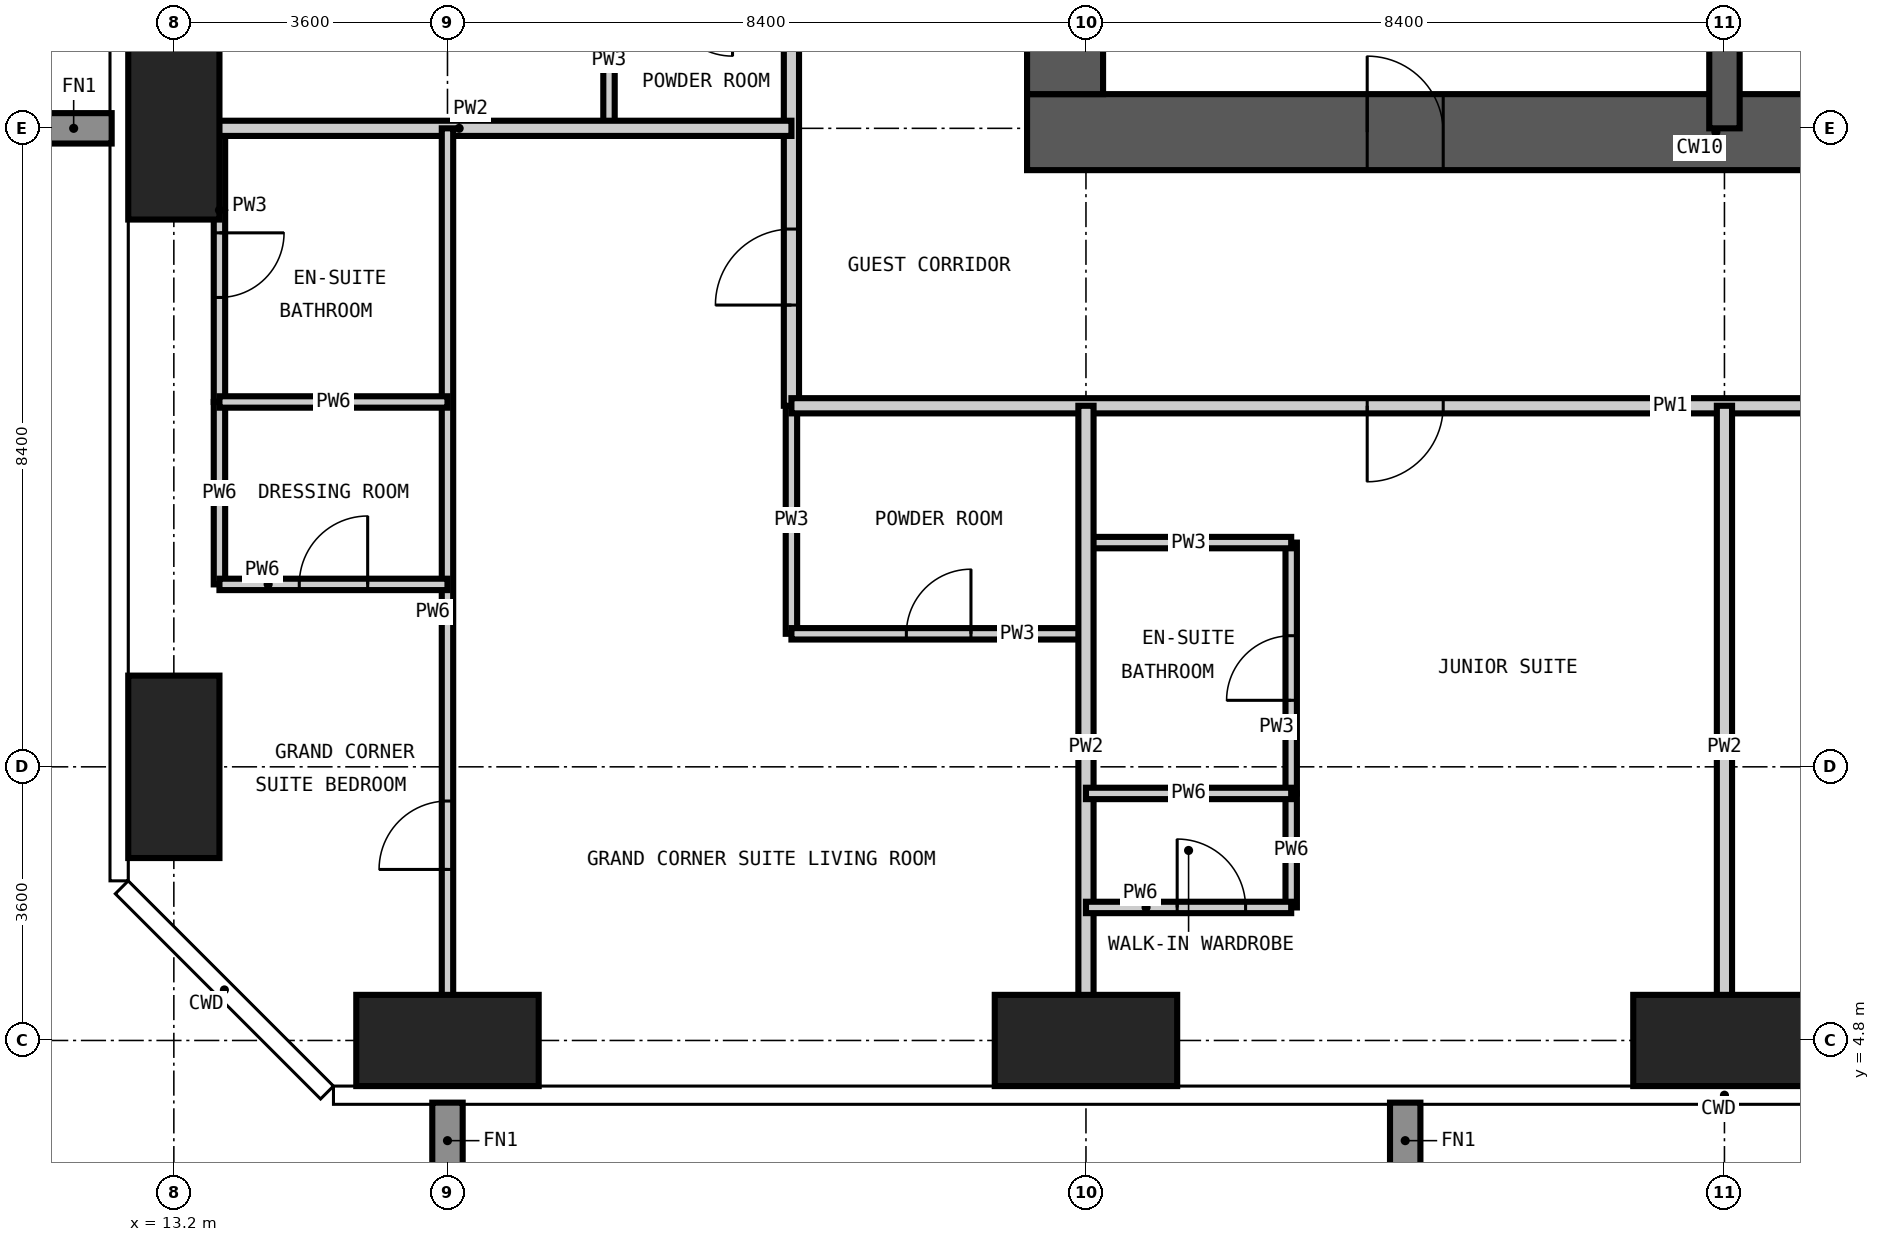
"""IFC4 building model, lengths in metres.
Left out: names, types, materials, properties, quantities, classifications, styles, units other than length and angle.
Written with IfcOpenShell. Run it as: python <this file> out.ifc"""

import sys

from ifc_helpers import new_model, si_unit, direction, frame, frame_2d, origin, origin_2d, place, context, subcontext, project, spatial, rectangle, extrude, element, fill, save


model = new_model("IFC4")
c1 = context("Model", 3, precision=1e-05, world=origin(), true_north=direction((0.0, 1.0)))
c2 = subcontext(c1, "Body", "Model", "MODEL_VIEW")
j1 = project(units=[si_unit("LENGTHUNIT", "METRE"), si_unit("PLANEANGLEUNIT", "RADIAN")], contexts=[c1])
p1 = place(None, origin())
s1 = spatial("IfcSite", under=j1, at=p1, CompositionType="ELEMENT")
p2 = place(p1, origin())
s2 = spatial("IfcBuilding", under=s1, at=p2, CompositionType="ELEMENT")
p3 = place(p2, frame((0.0, 0.0, 229.5)))
s3 = spatial("IfcBuildingStorey", under=s2, at=p3, CompositionType="ELEMENT", Elevation=229.5)
for number, where, z_axis, x_axis in (
    (1, (13.2, 8.4, -0.35), (0.0, 0.0, 1.0), (1.0, 0.0, 0.0)),
    (2, (13.2, 16.8, -0.35), (0.0, 0.0, 1.0), (1.0, 0.0, 0.0)),
):
    element("IfcColumn", number, at=place(p3, frame(where, z_axis=z_axis, x_axis=x_axis)), inside=s3, PredefinedType="COLUMN", context=c2, shape_type="SweptSolid", body=[
        extrude(rectangle(XDim=1.2, YDim=2.4, at=origin_2d()), origin(), (0.0, 0.0, 1.0), 3.9),
    ])
for number, where, z_axis, x_axis in (
    (3, (16.8, 4.8, -0.35), (0.0, 0.0, 1.0), (1.0, 0.0, 0.0)),
    (4, (25.2, 4.8, -0.35), (0.0, 0.0, 1.0), (1.0, 0.0, 0.0)),
    (5, (33.6, 4.8, -0.35), (0.0, 0.0, 1.0), (1.0, 0.0, 0.0)),
):
    element("IfcColumn", number, at=place(p3, frame(where, z_axis=z_axis, x_axis=x_axis)), inside=s3, PredefinedType="COLUMN", context=c2, shape_type="SweptSolid", body=[
        extrude(rectangle(XDim=2.4, YDim=1.2, at=origin_2d()), origin(), (0.0, 0.0, 1.0), 3.9),
    ])
p4 = place(p3, frame((24.425, 16.75, -0.35), z_axis=(0.0, 0.0, 1.0), x_axis=(1.0, 0.0, 0.0)))
e6 = element("IfcWall", 6, at=p4, inside=s3, PredefinedType="SHEAR", context=c2, shape_type="SweptSolid", body=[
    extrude(rectangle(XDim=18.125, YDim=1.0, at=frame_2d((9.062, 0.0))), origin(), (0.0, 0.0, 1.0), 3.9),
])
p5 = place(p4, frame((4.475, 0.0, 0.35)))
e7 = element("IfcOpeningElement", 7, at=p5, cuts=e6, PredefinedType="OPENING", context=c2, shape_type="SweptSolid", body=[
    extrude(rectangle(XDim=1.0, YDim=2.1, at=frame_2d((0.5, 1.05))), frame((0.0, 0.51, 0.0), z_axis=(0.0, -1.0, 0.0), x_axis=(1.0, 0.0, 0.0)), (0.0, 0.0, 1.0), 1.02),
])
p6 = place(p4, frame((10.775, 0.0, 0.35)))
e8 = element("IfcOpeningElement", 8, at=p6, cuts=e6, PredefinedType="OPENING", context=c2, shape_type="SweptSolid", body=[
    extrude(rectangle(XDim=1.0, YDim=2.1, at=frame_2d((0.5, 1.05))), frame((0.0, 0.51, 0.0), z_axis=(0.0, -1.0, 0.0), x_axis=(1.0, 0.0, 0.0)), (0.0, 0.0, 1.0), 1.02),
])
p7 = place(p3, frame((24.925, 41.55, -0.35), z_axis=(0.0, 0.0, 1.0), x_axis=(0.0, -1.0, 0.0)))
e9 = element("IfcWall", 9, at=p7, inside=s3, PredefinedType="SHEAR", context=c2, shape_type="SweptSolid", body=[
    extrude(rectangle(XDim=24.3, YDim=1.0, at=frame_2d((12.15, 0.0))), origin(), (0.0, 0.0, 1.0), 3.9),
])
p8 = place(p7, frame((11.65, 0.0, 0.35)))
e10 = element("IfcOpeningElement", 10, at=p8, cuts=e9, PredefinedType="OPENING", context=c2, shape_type="SweptSolid", body=[
    extrude(rectangle(XDim=1.0, YDim=2.1, at=frame_2d((0.5, 1.05))), frame((0.0, 0.51, 0.0), z_axis=(0.0, -1.0, 0.0), x_axis=(1.0, 0.0, 0.0)), (0.0, 0.0, 1.0), 1.02),
])
p9 = place(p3, frame((33.6, 16.8, -0.35), z_axis=(0.0, 0.0, 1.0), x_axis=(0.0, 1.0, 0.0)))
e11 = element("IfcWall", 11, at=p9, inside=s3, PredefinedType="SHEAR", context=c2, shape_type="SweptSolid", body=[
    extrude(rectangle(XDim=25.2, YDim=0.4, at=frame_2d((12.6, 0.0))), origin(), (0.0, 0.0, 1.0), 3.9),
])
p10 = place(p9, frame((22.5, 0.0, 0.35)))
e12 = element("IfcOpeningElement", 12, at=p10, cuts=e11, PredefinedType="OPENING", context=c2, shape_type="SweptSolid", body=[
    extrude(rectangle(XDim=1.2, YDim=2.2, at=frame_2d((0.6, 1.1))), frame((0.0, 0.21, 0.0), z_axis=(0.0, -1.0, 0.0), x_axis=(1.0, 0.0, 0.0)), (0.0, 0.0, 1.0), 0.42),
])
p11 = place(p9, frame((18.3, 0.0, 0.35)))
e13 = element("IfcOpeningElement", 13, at=p11, cuts=e11, PredefinedType="OPENING", context=c2, shape_type="SweptSolid", body=[
    extrude(rectangle(XDim=1.2, YDim=2.2, at=frame_2d((0.6, 1.1))), frame((0.0, 0.21, 0.0), z_axis=(0.0, -1.0, 0.0), x_axis=(1.0, 0.0, 0.0)), (0.0, 0.0, 1.0), 0.42),
])
p12 = place(p9, frame((9.3, 0.0, 0.35)))
e14 = element("IfcOpeningElement", 14, at=p12, cuts=e11, PredefinedType="OPENING", context=c2, shape_type="SweptSolid", body=[
    extrude(rectangle(XDim=1.0, YDim=2.1, at=frame_2d((0.5, 1.05))), frame((0.0, 0.21, 0.0), z_axis=(0.0, -1.0, 0.0), x_axis=(1.0, 0.0, 0.0)), (0.0, 0.0, 1.0), 0.42),
])
p13 = place(p3, frame((13.8, 13.2, 0.0), z_axis=(0.0, 0.0, 1.0), x_axis=(0.0, 1.0, 0.0)))
e15 = element("IfcWall", 15, at=p13, inside=s3, PredefinedType="PARTITIONING", context=c2, shape_type="SweptSolid", body=[
    extrude(rectangle(XDim=3.6, YDim=0.15, at=frame_2d((1.8, 0.0))), origin(), (0.0, 0.0, 1.0), 3.55),
])
p14 = place(p13, frame((1.375, 0.0, 0.0)))
e16 = element("IfcOpeningElement", 16, at=p14, cuts=e15, PredefinedType="OPENING", context=c2, shape_type="SweptSolid", body=[
    extrude(rectangle(XDim=0.85, YDim=2.1, at=frame_2d((0.425, 1.05))), frame((0.0, 0.085, 0.0), z_axis=(0.0, -1.0, 0.0), x_axis=(1.0, 0.0, 0.0)), (0.0, 0.0, 1.0), 0.17),
])
p15 = place(p3, frame((18.925, 16.8, 0.0), z_axis=(0.0, 0.0, 1.0), x_axis=(0.0, 1.0, 0.0)))
e17 = element("IfcWall", 17, at=p15, inside=s3, PredefinedType="PARTITIONING", context=c2, shape_type="SweptSolid", body=[
    extrude(rectangle(XDim=1.8, YDim=0.15, at=frame_2d((0.9, 0.0))), origin(), (0.0, 0.0, 1.0), 3.55),
])
p16 = place(p3, frame((21.325, 10.15, 0.0), z_axis=(0.0, 0.0, 1.0), x_axis=(0.0, 1.0, 0.0)))
e18 = element("IfcWall", 18, at=p16, inside=s3, PredefinedType="PARTITIONING", context=c2, shape_type="SweptSolid", body=[
    extrude(rectangle(XDim=3.0, YDim=0.15, at=frame_2d((1.5, 0.0))), origin(), (0.0, 0.0, 1.0), 3.55),
])
p17 = place(p3, frame((27.9, 8.05, 0.0), z_axis=(0.0, 0.0, 1.0), x_axis=(0.0, 1.0, 0.0)))
e19 = element("IfcWall", 19, at=p17, inside=s3, PredefinedType="PARTITIONING", context=c2, shape_type="SweptSolid", body=[
    extrude(rectangle(XDim=3.3, YDim=0.15, at=frame_2d((1.65, 0.0))), origin(), (0.0, 0.0, 1.0), 3.55),
])
p18 = place(p17, frame((1.225, 0.0, 0.0)))
e20 = element("IfcOpeningElement", 20, at=p18, cuts=e19, PredefinedType="OPENING", context=c2, shape_type="SweptSolid", body=[
    extrude(rectangle(XDim=0.85, YDim=2.1, at=frame_2d((0.425, 1.05))), frame((0.0, 0.085, 0.0), z_axis=(0.0, -1.0, 0.0), x_axis=(1.0, 0.0, 0.0)), (0.0, 0.0, 1.0), 0.17),
])
p19 = place(p3, frame((21.325, 10.15, 0.0), z_axis=(0.0, 0.0, 1.0), x_axis=(1.0, 0.0, 0.0)))
e21 = element("IfcWall", 21, at=p19, inside=s3, PredefinedType="PARTITIONING", context=c2, shape_type="SweptSolid", body=[
    extrude(rectangle(XDim=3.875, YDim=0.15, at=frame_2d((1.938, 0.0))), origin(), (0.0, 0.0, 1.0), 3.55),
])
p20 = place(p19, frame((1.512, 0.0, 0.0)))
e22 = element("IfcOpeningElement", 22, at=p20, cuts=e21, PredefinedType="OPENING", context=c2, shape_type="SweptSolid", body=[
    extrude(rectangle(XDim=0.85, YDim=2.1, at=frame_2d((0.425, 1.05))), frame((0.0, 0.085, 0.0), z_axis=(0.0, -1.0, 0.0), x_axis=(1.0, 0.0, 0.0)), (0.0, 0.0, 1.0), 0.17),
])
p21 = place(p3, frame((25.2, 11.35, 0.0), z_axis=(0.0, 0.0, 1.0), x_axis=(1.0, 0.0, 0.0)))
e23 = element("IfcWall", 23, at=p21, inside=s3, PredefinedType="PARTITIONING", context=c2, shape_type="SweptSolid", body=[
    extrude(rectangle(XDim=2.7, YDim=0.15, at=frame_2d((1.35, 0.0))), origin(), (0.0, 0.0, 1.0), 3.55),
])
p22 = place(p3, frame((21.325, 13.15, 0.0), z_axis=(0.0, 0.0, 1.0), x_axis=(0.0, 1.0, 0.0)))
e24 = element("IfcWall", 24, at=p22, inside=s3, PredefinedType="PARTITIONING", context=c2, shape_type="SweptSolid", body=[
    extrude(rectangle(XDim=31.9, YDim=0.2, at=frame_2d((15.95, 0.0))), origin(), (0.0, 0.0, 1.0), 3.55),
])
p23 = place(p22, frame((6.15, 0.0, 0.0)))
e25 = element("IfcOpeningElement", 25, at=p23, cuts=e24, PredefinedType="OPENING", context=c2, shape_type="SweptSolid", body=[
    extrude(rectangle(XDim=1.0, YDim=2.2, at=frame_2d((0.5, 1.1))), frame((0.0, 0.11, 0.0), z_axis=(0.0, -1.0, 0.0), x_axis=(1.0, 0.0, 0.0)), (0.0, 0.0, 1.0), 0.22),
])
p24 = place(p22, frame((16.95, 0.0, 0.0)))
e26 = element("IfcOpeningElement", 26, at=p24, cuts=e24, PredefinedType="OPENING", context=c2, shape_type="SweptSolid", body=[
    extrude(rectangle(XDim=1.0, YDim=2.2, at=frame_2d((0.5, 1.1))), frame((0.0, 0.11, 0.0), z_axis=(0.0, -1.0, 0.0), x_axis=(1.0, 0.0, 0.0)), (0.0, 0.0, 1.0), 0.22),
])
p25 = place(p22, frame((22.95, 0.0, 0.0)))
e27 = element("IfcOpeningElement", 27, at=p25, cuts=e24, PredefinedType="OPENING", context=c2, shape_type="SweptSolid", body=[
    extrude(rectangle(XDim=1.0, YDim=2.2, at=frame_2d((0.5, 1.1))), frame((0.0, 0.11, 0.0), z_axis=(0.0, -1.0, 0.0), x_axis=(1.0, 0.0, 0.0)), (0.0, 0.0, 1.0), 0.22),
])
p26 = place(p22, frame((1.325, 0.0, 0.0)))
e28 = element("IfcOpeningElement", 28, at=p26, cuts=e24, PredefinedType="OPENING", context=c2, shape_type="SweptSolid", body=[
    extrude(rectangle(XDim=1.0, YDim=2.2, at=frame_2d((0.5, 1.1))), frame((0.0, 0.11, 0.0), z_axis=(0.0, -1.0, 0.0), x_axis=(1.0, 0.0, 0.0)), (0.0, 0.0, 1.0), 0.22),
])
p27 = place(p22, frame((29.875, 0.0, 0.0)))
e29 = element("IfcOpeningElement", 29, at=p27, cuts=e24, PredefinedType="OPENING", context=c2, shape_type="SweptSolid", body=[
    extrude(rectangle(XDim=1.0, YDim=2.2, at=frame_2d((0.5, 1.1))), frame((0.0, 0.11, 0.0), z_axis=(0.0, -1.0, 0.0), x_axis=(1.0, 0.0, 0.0)), (0.0, 0.0, 1.0), 0.22),
])
p28 = place(p3, frame((44.45, 13.15, 0.0), z_axis=(0.0, 0.0, 1.0), x_axis=(-1.0, 0.0, 0.0)))
e30 = element("IfcWall", 30, at=p28, inside=s3, PredefinedType="PARTITIONING", context=c2, shape_type="SweptSolid", body=[
    extrude(rectangle(XDim=23.125, YDim=0.2, at=frame_2d((11.562, 0.0))), origin(), (0.0, 0.0, 1.0), 3.55),
])
p29 = place(p28, frame((14.55, 0.0, 0.0)))
e31 = element("IfcOpeningElement", 31, at=p29, cuts=e30, PredefinedType="OPENING", context=c2, shape_type="SweptSolid", body=[
    extrude(rectangle(XDim=1.0, YDim=2.2, at=frame_2d((0.5, 1.1))), frame((0.0, 0.11, 0.0), z_axis=(0.0, -1.0, 0.0), x_axis=(1.0, 0.0, 0.0)), (0.0, 0.0, 1.0), 0.22),
])
p30 = place(p28, frame((6.15, 0.0, 0.0)))
e32 = element("IfcOpeningElement", 32, at=p30, cuts=e30, PredefinedType="OPENING", context=c2, shape_type="SweptSolid", body=[
    extrude(rectangle(XDim=1.0, YDim=2.2, at=frame_2d((0.5, 1.1))), frame((0.0, 0.11, 0.0), z_axis=(0.0, -1.0, 0.0), x_axis=(1.0, 0.0, 0.0)), (0.0, 0.0, 1.0), 0.22),
])
for number, where, z_axis, x_axis in (
    (33, (25.2, 4.182, 0.0), (0.0, 0.0, 1.0), (0.0, 1.0, 0.0)),
    (34, (33.6, 4.182, 0.0), (0.0, 0.0, 1.0), (0.0, 1.0, 0.0)),
):
    element("IfcWall", number, at=place(p3, frame(where, z_axis=z_axis, x_axis=x_axis)), inside=s3, PredefinedType="PARTITIONING", context=c2, shape_type="SweptSolid", body=[
        extrude(rectangle(XDim=8.968, YDim=0.2, at=frame_2d((4.484, 0.0))), origin(), (0.0, 0.0, 1.0), 3.55),
    ])
p31 = place(p3, frame((12.582, 16.8, 0.0), z_axis=(0.0, 0.0, 1.0), x_axis=(1.0, 0.0, 0.0)))
e35 = element("IfcWall", 35, at=p31, inside=s3, PredefinedType="PARTITIONING", context=c2, shape_type="SweptSolid", body=[
    extrude(rectangle(XDim=8.743, YDim=0.2, at=frame_2d((4.372, 0.0))), origin(), (0.0, 0.0, 1.0), 3.55),
])
p32 = place(p3, frame((13.8, 10.8, 0.0), z_axis=(0.0, 0.0, 1.0), x_axis=(0.0, 1.0, 0.0)))
e36 = element("IfcWall", 36, at=p32, inside=s3, PredefinedType="PARTITIONING", context=c2, shape_type="SweptSolid", body=[
    extrude(rectangle(XDim=2.4, YDim=0.15, at=frame_2d((1.2, 0.0))), origin(), (0.0, 0.0, 1.0), 3.55),
])
p33 = place(p3, frame((16.8, 4.182, 0.0), z_axis=(0.0, 0.0, 1.0), x_axis=(0.0, 1.0, 0.0)))
e37 = element("IfcWall", 37, at=p33, inside=s3, PredefinedType="PARTITIONING", context=c2, shape_type="SweptSolid", body=[
    extrude(rectangle(XDim=12.618, YDim=0.15, at=frame_2d((6.309, 0.0))), origin(), (0.0, 0.0, 1.0), 3.55),
])
p34 = place(p33, frame((2.868, 0.0, 0.0)))
e38 = element("IfcOpeningElement", 38, at=p34, cuts=e37, PredefinedType="OPENING", context=c2, shape_type="SweptSolid", body=[
    extrude(rectangle(XDim=0.9, YDim=2.1, at=frame_2d((0.45, 1.05))), frame((0.0, 0.085, 0.0), z_axis=(0.0, -1.0, 0.0), x_axis=(1.0, 0.0, 0.0)), (0.0, 0.0, 1.0), 0.17),
])
p35 = place(p3, frame((27.9, 6.55, 0.0), z_axis=(0.0, 0.0, 1.0), x_axis=(0.0, 1.0, 0.0)))
e39 = element("IfcWall", 39, at=p35, inside=s3, PredefinedType="PARTITIONING", context=c2, shape_type="SweptSolid", body=[
    extrude(rectangle(XDim=1.5, YDim=0.15, at=frame_2d((0.75, 0.0))), origin(), (0.0, 0.0, 1.0), 3.55),
])
p36 = place(p3, frame((25.2, 6.55, 0.0), z_axis=(0.0, 0.0, 1.0), x_axis=(1.0, 0.0, 0.0)))
e40 = element("IfcWall", 40, at=p36, inside=s3, PredefinedType="PARTITIONING", context=c2, shape_type="SweptSolid", body=[
    extrude(rectangle(XDim=2.7, YDim=0.15, at=frame_2d((1.35, 0.0))), origin(), (0.0, 0.0, 1.0), 3.55),
])
p37 = place(p36, frame((1.2, 0.0, 0.0)))
e41 = element("IfcOpeningElement", 41, at=p37, cuts=e40, PredefinedType="OPENING", context=c2, shape_type="SweptSolid", body=[
    extrude(rectangle(XDim=0.9, YDim=2.1, at=frame_2d((0.45, 1.05))), frame((0.0, 0.085, 0.0), z_axis=(0.0, -1.0, 0.0), x_axis=(1.0, 0.0, 0.0)), (0.0, 0.0, 1.0), 0.17),
])
p38 = place(p3, frame((25.2, 8.05, 0.0), z_axis=(0.0, 0.0, 1.0), x_axis=(1.0, 0.0, 0.0)))
e42 = element("IfcWall", 42, at=p38, inside=s3, PredefinedType="PARTITIONING", context=c2, shape_type="SweptSolid", body=[
    extrude(rectangle(XDim=2.7, YDim=0.15, at=frame_2d((1.35, 0.0))), origin(), (0.0, 0.0, 1.0), 3.55),
])
p39 = place(p3, frame((13.8, 10.8, 0.0), z_axis=(0.0, 0.0, 1.0), x_axis=(1.0, 0.0, 0.0)))
e43 = element("IfcWall", 43, at=p39, inside=s3, PredefinedType="PARTITIONING", context=c2, shape_type="SweptSolid", body=[
    extrude(rectangle(XDim=3.0, YDim=0.15, at=frame_2d((1.5, 0.0))), origin(), (0.0, 0.0, 1.0), 3.55),
])
p40 = place(p39, frame((1.05, 0.0, 0.0)))
e44 = element("IfcOpeningElement", 44, at=p40, cuts=e43, PredefinedType="OPENING", context=c2, shape_type="SweptSolid", body=[
    extrude(rectangle(XDim=0.9, YDim=2.1, at=frame_2d((0.45, 1.05))), frame((0.0, 0.085, 0.0), z_axis=(0.0, -1.0, 0.0), x_axis=(1.0, 0.0, 0.0)), (0.0, 0.0, 1.0), 0.17),
])
p41 = place(p3, frame((13.8, 13.2, 0.0), z_axis=(0.0, 0.0, 1.0), x_axis=(1.0, 0.0, 0.0)))
e45 = element("IfcWall", 45, at=p41, inside=s3, PredefinedType="PARTITIONING", context=c2, shape_type="SweptSolid", body=[
    extrude(rectangle(XDim=3.0, YDim=0.15, at=frame_2d((1.5, 0.0))), origin(), (0.0, 0.0, 1.0), 3.55),
])
p42 = place(p29, origin())
e46 = element("IfcDoor", 46, at=p42, inside=s3, OperationType="SINGLE_SWING_RIGHT", PredefinedType="DOOR", context=c2, shape_type="SweptSolid", body=[
    extrude(rectangle(XDim=1.0, YDim=2.2, at=frame_2d((0.5, 1.1))), frame((0.0, 0.025, 0.0), z_axis=(0.0, -1.0, 0.0), x_axis=(1.0, 0.0, 0.0)), (0.0, 0.0, 1.0), 0.05),
])
fill(e31, e46)
p43 = place(p18, origin())
e47 = element("IfcDoor", 47, at=p43, inside=s3, OperationType="SINGLE_SWING_LEFT", PredefinedType="DOOR", context=c2, shape_type="SweptSolid", body=[
    extrude(rectangle(XDim=0.85, YDim=2.1, at=frame_2d((0.425, 1.05))), frame((0.0, 0.025, 0.0), z_axis=(0.0, -1.0, 0.0), x_axis=(1.0, 0.0, 0.0)), (0.0, 0.0, 1.0), 0.05),
])
fill(e20, e47)
p44 = place(p37, origin())
e48 = element("IfcDoor", 48, at=p44, inside=s3, OperationType="SINGLE_SWING_LEFT", PredefinedType="DOOR", context=c2, shape_type="SweptSolid", body=[
    extrude(rectangle(XDim=0.9, YDim=2.1, at=frame_2d((0.45, 1.05))), frame((0.0, 0.025, 0.0), z_axis=(0.0, -1.0, 0.0), x_axis=(1.0, 0.0, 0.0)), (0.0, 0.0, 1.0), 0.05),
])
fill(e41, e48)
p45 = place(p26, origin())
e49 = element("IfcDoor", 49, at=p45, inside=s3, OperationType="SINGLE_SWING_LEFT", PredefinedType="DOOR", context=c2, shape_type="SweptSolid", body=[
    extrude(rectangle(XDim=1.0, YDim=2.2, at=frame_2d((0.5, 1.1))), frame((0.0, 0.025, 0.0), z_axis=(0.0, -1.0, 0.0), x_axis=(1.0, 0.0, 0.0)), (0.0, 0.0, 1.0), 0.05),
])
fill(e28, e49)
p46 = place(p20, origin())
e50 = element("IfcDoor", 50, at=p46, inside=s3, OperationType="SINGLE_SWING_RIGHT", PredefinedType="DOOR", context=c2, shape_type="SweptSolid", body=[
    extrude(rectangle(XDim=0.85, YDim=2.1, at=frame_2d((0.425, 1.05))), frame((0.0, 0.025, 0.0), z_axis=(0.0, -1.0, 0.0), x_axis=(1.0, 0.0, 0.0)), (0.0, 0.0, 1.0), 0.05),
])
fill(e22, e50)
p47 = place(p34, origin())
e51 = element("IfcDoor", 51, at=p47, inside=s3, OperationType="SINGLE_SWING_LEFT", PredefinedType="DOOR", context=c2, shape_type="SweptSolid", body=[
    extrude(rectangle(XDim=0.9, YDim=2.1, at=frame_2d((0.45, 1.05))), frame((0.0, 0.025, 0.0), z_axis=(0.0, -1.0, 0.0), x_axis=(1.0, 0.0, 0.0)), (0.0, 0.0, 1.0), 0.05),
])
fill(e38, e51)
p48 = place(p14, frame((0.85, 0.0, 0.0), z_axis=(0.0, 0.0, 1.0), x_axis=(-1.0, 0.0, 0.0)))
e52 = element("IfcDoor", 52, at=p48, inside=s3, OperationType="SINGLE_SWING_LEFT", PredefinedType="DOOR", context=c2, shape_type="SweptSolid", body=[
    extrude(rectangle(XDim=0.85, YDim=2.1, at=frame_2d((0.425, 1.05))), frame((0.0, 0.025, 0.0), z_axis=(0.0, -1.0, 0.0), x_axis=(1.0, 0.0, 0.0)), (0.0, 0.0, 1.0), 0.05),
])
fill(e16, e52)
p49 = place(p40, origin())
e53 = element("IfcDoor", 53, at=p49, inside=s3, OperationType="SINGLE_SWING_RIGHT", PredefinedType="DOOR", context=c2, shape_type="SweptSolid", body=[
    extrude(rectangle(XDim=0.9, YDim=2.1, at=frame_2d((0.45, 1.05))), frame((0.0, 0.025, 0.0), z_axis=(0.0, -1.0, 0.0), x_axis=(1.0, 0.0, 0.0)), (0.0, 0.0, 1.0), 0.05),
])
fill(e44, e53)
p50 = place(p5, origin())
e54 = element("IfcDoor", 54, at=p50, inside=s3, OperationType="SINGLE_SWING_LEFT", PredefinedType="DOOR", context=c2, shape_type="SweptSolid", body=[
    extrude(rectangle(XDim=1.0, YDim=2.1, at=frame_2d((0.5, 1.05))), frame((0.0, 0.025, 0.0), z_axis=(0.0, -1.0, 0.0), x_axis=(1.0, 0.0, 0.0)), (0.0, 0.0, 1.0), 0.05),
])
fill(e7, e54)
save(model, sys.argv[1])
